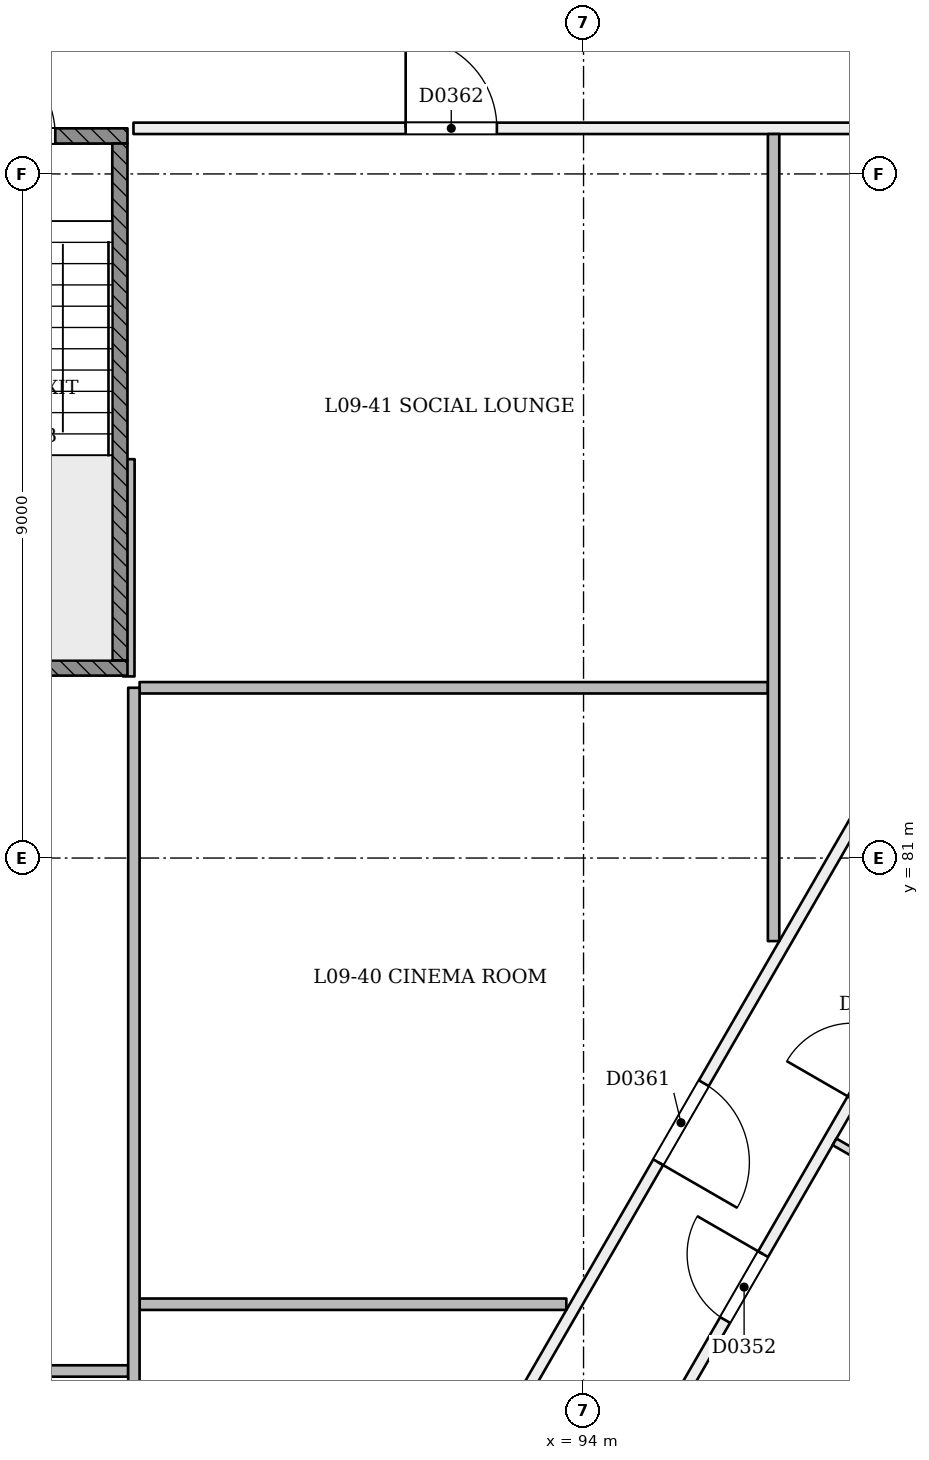
"""IFC4 building model, lengths in metres.
Left out: names, types, materials, properties, quantities, classifications, styles, units other than length and angle.
Written with IfcOpenShell. Run it as: python <this file> out.ifc"""

import sys

from ifc_helpers import new_model, si_unit, direction, frame, frame_2d, origin, place, context, subcontext, project, spatial, rectangle, extrude, element, fill, save


model = new_model("IFC4")
c1 = context("Model", 3, precision=1e-05, world=origin(), true_north=direction((0.0, 1.0)))
c2 = subcontext(c1, "Body", "Model", "MODEL_VIEW")
j1 = project(units=[si_unit("LENGTHUNIT", "METRE"), si_unit("PLANEANGLEUNIT", "RADIAN")], contexts=[c1])
p1 = place(None, origin())
s1 = spatial("IfcSite", under=j1, at=p1, CompositionType="ELEMENT")
p2 = place(p1, origin())
s2 = spatial("IfcBuilding", under=s1, at=p2, CompositionType="ELEMENT")
p3 = place(p2, frame((0.0, 0.0, 41.4)))
s3 = spatial("IfcBuildingStorey", under=s2, at=p3, CompositionType="ELEMENT", Elevation=41.4)
p4 = place(p3, frame((88.237, 61.716, 0.0), z_axis=(0.0, 0.0, 1.0), x_axis=(0.500002225217, 0.866024119051, 0.0)))
e1 = element("IfcWall", 1, at=p4, inside=s3, PredefinedType="PARTITIONING", context=c2, shape_type="SweptSolid", body=[
    extrude(rectangle(XDim=38.6, YDim=0.15, at=frame_2d((19.3, 0.0))), origin(), (0.0, 0.0, 1.0), 2.7),
])
p5 = place(p4, frame((0.72, 0.0, 0.0)))
e2 = element("IfcOpeningElement", 2, at=p5, cuts=e1, PredefinedType="OPENING", context=c2, shape_type="SweptSolid", body=[
    extrude(rectangle(XDim=1.0, YDim=2.1, at=frame_2d((0.5, 1.05))), frame((0.0, 0.085, 0.0), z_axis=(0.0, -1.0, 0.0), x_axis=(1.0, 0.0, 0.0)), (0.0, 0.0, 1.0), 0.171),
])
p6 = place(p4, frame((7.395, 0.0, 0.0)))
e3 = element("IfcOpeningElement", 3, at=p6, cuts=e1, PredefinedType="OPENING", context=c2, shape_type="SweptSolid", body=[
    extrude(rectangle(XDim=1.0, YDim=2.1, at=frame_2d((0.5, 1.05))), frame((0.0, 0.085, 0.0), z_axis=(0.0, -1.0, 0.0), x_axis=(1.0, 0.0, 0.0)), (0.0, 0.0, 1.0), 0.171),
])
p7 = place(p4, frame((9.605, 0.0, 0.0)))
e4 = element("IfcOpeningElement", 4, at=p7, cuts=e1, PredefinedType="OPENING", context=c2, shape_type="SweptSolid", body=[
    extrude(rectangle(XDim=1.0, YDim=2.1, at=frame_2d((0.5, 1.05))), frame((0.0, 0.085, 0.0), z_axis=(0.0, -1.0, 0.0), x_axis=(1.0, 0.0, 0.0)), (0.0, 0.0, 1.0), 0.171),
])
p8 = place(p4, frame((15.25, 0.0, 0.0)))
e5 = element("IfcOpeningElement", 5, at=p8, cuts=e1, PredefinedType="OPENING", context=c2, shape_type="SweptSolid", body=[
    extrude(rectangle(XDim=1.0, YDim=2.1, at=frame_2d((0.5, 1.05))), frame((0.0, 0.085, 0.0), z_axis=(0.0, -1.0, 0.0), x_axis=(1.0, 0.0, 0.0)), (0.0, 0.0, 1.0), 0.171),
])
p9 = place(p4, frame((18.605, 0.0, 0.0)))
e6 = element("IfcOpeningElement", 6, at=p9, cuts=e1, PredefinedType="OPENING", context=c2, shape_type="SweptSolid", body=[
    extrude(rectangle(XDim=1.0, YDim=2.1, at=frame_2d((0.5, 1.05))), frame((0.0, 0.085, 0.0), z_axis=(0.0, -1.0, 0.0), x_axis=(1.0, 0.0, 0.0)), (0.0, 0.0, 1.0), 0.171),
])
p10 = place(p4, frame((25.395, 0.0, 0.0)))
e7 = element("IfcOpeningElement", 7, at=p10, cuts=e1, PredefinedType="OPENING", context=c2, shape_type="SweptSolid", body=[
    extrude(rectangle(XDim=1.0, YDim=2.1, at=frame_2d((0.5, 1.05))), frame((0.0, 0.085, 0.0), z_axis=(0.0, -1.0, 0.0), x_axis=(1.0, 0.0, 0.0)), (0.0, 0.0, 1.0), 0.171),
])
p11 = place(p4, frame((29.8, 0.0, 0.0)))
e8 = element("IfcOpeningElement", 8, at=p11, cuts=e1, PredefinedType="OPENING", context=c2, shape_type="SweptSolid", body=[
    extrude(rectangle(XDim=1.2, YDim=2.1, at=frame_2d((0.6, 1.05))), frame((0.0, 0.085, 0.0), z_axis=(0.0, -1.0, 0.0), x_axis=(1.0, 0.0, 0.0)), (0.0, 0.0, 1.0), 0.171),
])
p12 = place(p4, frame((37.145, 0.0, 0.0)))
e9 = element("IfcOpeningElement", 9, at=p12, cuts=e1, PredefinedType="OPENING", context=c2, shape_type="SweptSolid", body=[
    extrude(rectangle(XDim=1.2, YDim=2.1, at=frame_2d((0.6, 1.05))), frame((0.0, 0.085, 0.0), z_axis=(0.0, -1.0, 0.0), x_axis=(1.0, 0.0, 0.0)), (0.0, 0.0, 1.0), 0.171),
])
p13 = place(p3, frame((88.079, 90.6, 0.0), z_axis=(0.0, 0.0, 1.0), x_axis=(1.0, 0.0, 0.0)))
e10 = element("IfcWall", 10, at=p13, inside=s3, PredefinedType="PARTITIONING", context=c2, shape_type="SweptSolid", body=[
    extrude(rectangle(XDim=14.626, YDim=0.15, at=frame_2d((7.313, 0.0))), origin(), (0.0, 0.0, 1.0), 3.1),
])
p14 = place(p13, frame((3.581, 0.0, 0.0)))
e11 = element("IfcOpeningElement", 11, at=p14, cuts=e10, PredefinedType="OPENING", context=c2, shape_type="SweptSolid", body=[
    extrude(rectangle(XDim=1.2, YDim=2.1, at=frame_2d((0.6, 1.05))), frame((0.0, 0.085, 0.0), z_axis=(0.0, -1.0, 0.0), x_axis=(1.0, 0.0, 0.0)), (0.0, 0.0, 1.0), 0.171),
])
p15 = place(p3, frame((102.835, 90.6, 0.0), z_axis=(0.0, 0.0, 1.0), x_axis=(-0.49999562485, -0.866027929764, 0.0)))
e12 = element("IfcWall", 12, at=p15, inside=s3, PredefinedType="PARTITIONING", context=c2, shape_type="SweptSolid", body=[
    extrude(rectangle(XDim=35.561, YDim=0.15, at=frame_2d((17.781, 0.0))), origin(), (0.0, 0.0, 1.0), 3.1),
])
p16 = place(p15, frame((14.506, 0.0, 0.0)))
e13 = element("IfcOpeningElement", 13, at=p16, cuts=e12, PredefinedType="OPENING", context=c2, shape_type="SweptSolid", body=[
    extrude(rectangle(XDim=1.2, YDim=2.1, at=frame_2d((0.6, 1.05))), frame((0.0, 0.085, 0.0), z_axis=(0.0, -1.0, 0.0), x_axis=(1.0, 0.0, 0.0)), (0.0, 0.0, 1.0), 0.171),
])
p17 = place(p15, frame((29.404, 0.0, 0.0)))
e14 = element("IfcOpeningElement", 14, at=p17, cuts=e12, PredefinedType="OPENING", context=c2, shape_type="SweptSolid", body=[
    extrude(rectangle(XDim=1.2, YDim=2.1, at=frame_2d((0.6, 1.05))), frame((0.0, 0.085, 0.0), z_axis=(0.0, -1.0, 0.0), x_axis=(1.0, 0.0, 0.0)), (0.0, 0.0, 1.0), 0.171),
])
p18 = place(p15, frame((4.779, 0.0, 0.0)))
e15 = element("IfcOpeningElement", 15, at=p18, cuts=e12, PredefinedType="OPENING", context=c2, shape_type="SweptSolid", body=[
    extrude(rectangle(XDim=1.0, YDim=2.1, at=frame_2d((0.5, 1.05))), frame((0.0, 0.085, 0.0), z_axis=(0.0, -1.0, 0.0), x_axis=(1.0, 0.0, 0.0)), (0.0, 0.0, 1.0), 0.171),
])
p19 = place(p15, frame((22.212, 0.0, 0.0)))
e16 = element("IfcOpeningElement", 16, at=p19, cuts=e12, PredefinedType="OPENING", context=c2, shape_type="SweptSolid", body=[
    extrude(rectangle(XDim=1.0, YDim=2.1, at=frame_2d((0.5, 1.05))), frame((0.0, 0.085, 0.0), z_axis=(0.0, -1.0, 0.0), x_axis=(1.0, 0.0, 0.0)), (0.0, 0.0, 1.0), 0.171),
])
p20 = place(p3, frame((102.797, 74.094, 0.0), z_axis=(0.0, 0.0, 1.0), x_axis=(-0.866025401434, 0.500000004071, 0.0)))
e17 = element("IfcWall", 17, at=p20, inside=s3, PredefinedType="PARTITIONING", context=c2, shape_type="SweptSolid", body=[
    extrude(rectangle(XDim=6.345, YDim=0.1, at=frame_2d((3.173, 0.0))), origin(), (0.0, 0.0, 1.0), 2.6),
])
p21 = place(p3, frame((88.017, 83.389, 0.0), z_axis=(0.0, 0.0, 1.0), x_axis=(0.000597983833, 0.999999821208, 0.0)))
e18 = element("IfcWall", 18, at=p21, inside=s3, PredefinedType="PARTITIONING", context=c2, shape_type="SweptSolid", body=[
    extrude(rectangle(XDim=2.858, YDim=0.15, at=frame_2d((1.429, 0.0))), origin(), (0.0, 0.0, 1.0), 3.1),
])
p22 = place(p3, frame((76.733, 74.252, 0.0), z_axis=(0.0, 0.0, 1.0), x_axis=(1.0, 0.0, 0.0)))
e19 = element("IfcWall", 19, at=p22, inside=s3, PredefinedType="PARTITIONING", context=c2, shape_type="SweptSolid", body=[
    extrude(rectangle(XDim=11.276, YDim=0.15, at=frame_2d((5.638, 0.0))), origin(), (0.0, 0.0, 1.0), 3.1),
])
p23 = place(p3, frame((96.425, 83.24, 0.0), z_axis=(0.0, 0.0, 1.0), x_axis=(-1.0, 0.0, 0.0)))
e20 = element("IfcWall", 20, at=p23, inside=s3, PredefinedType="PARTITIONING", context=c2, shape_type="SweptSolid", body=[
    extrude(rectangle(XDim=8.266, YDim=0.15, at=frame_2d((4.133, 0.0))), origin(), (0.0, 0.0, 1.0), 3.1),
])
p24 = place(p3, frame((88.159, 75.13, 0.0), z_axis=(0.0, 0.0, 1.0), x_axis=(1.0, 0.0, 0.0)))
e21 = element("IfcWall", 21, at=p24, inside=s3, PredefinedType="PARTITIONING", context=c2, shape_type="SweptSolid", body=[
    extrude(rectangle(XDim=5.615, YDim=0.15, at=frame_2d((2.807, 0.0))), origin(), (0.0, 0.0, 1.0), 3.1),
])
p25 = place(p3, frame((96.5, 79.907, 0.0), z_axis=(0.0, 0.0, 1.0), x_axis=(0.0, 1.0, 0.0)))
e22 = element("IfcWall", 22, at=p25, inside=s3, PredefinedType="PARTITIONING", context=c2, shape_type="SweptSolid", body=[
    extrude(rectangle(XDim=10.618, YDim=0.15, at=frame_2d((5.309, 0.0))), origin(), (0.0, 0.0, 1.0), 3.1),
])
p26 = place(p3, frame((88.084, 65.33, 0.0), z_axis=(0.0, 0.0, 1.0), x_axis=(0.0, 1.0, 0.0)))
e23 = element("IfcWall", 23, at=p26, inside=s3, PredefinedType="PARTITIONING", context=c2, shape_type="SweptSolid", body=[
    extrude(rectangle(XDim=17.91, YDim=0.15, at=frame_2d((8.955, 0.0))), origin(), (0.0, 0.0, 1.0), 3.1),
])
p27 = place(p3, frame((82.0, 90.5, 0.0), z_axis=(0.0, 0.0, 1.0), x_axis=(1.0, 0.0, 0.0)))
e24 = element("IfcWall", 24, at=p27, inside=s3, PredefinedType="SOLIDWALL", context=c2, shape_type="SweptSolid", body=[
    extrude(rectangle(XDim=6.0, YDim=0.2, at=frame_2d((3.0, 0.0))), origin(), (0.0, 0.0, 1.0), 3.1),
])
p28 = place(p27, frame((0.95, 0.0, 0.0)))
e25 = element("IfcOpeningElement", 25, at=p28, cuts=e24, PredefinedType="OPENING", context=c2, shape_type="SweptSolid", body=[
    extrude(rectangle(XDim=1.2, YDim=2.1, at=frame_2d((0.6, 1.05))), frame((0.0, 0.11, 0.0), z_axis=(0.0, -1.0, 0.0), x_axis=(1.0, 0.0, 0.0)), (0.0, 0.0, 1.0), 0.221),
])
p29 = place(p27, frame((3.85, 0.0, 0.0)))
e26 = element("IfcOpeningElement", 26, at=p29, cuts=e24, PredefinedType="OPENING", context=c2, shape_type="SweptSolid", body=[
    extrude(rectangle(XDim=1.2, YDim=2.1, at=frame_2d((0.6, 1.05))), frame((0.0, 0.11, 0.0), z_axis=(0.0, -1.0, 0.0), x_axis=(1.0, 0.0, 0.0)), (0.0, 0.0, 1.0), 0.221),
])
p30 = place(p3, frame((82.0, 83.5, 0.0), z_axis=(0.0, 0.0, 1.0), x_axis=(1.0, 0.0, 0.0)))
e27 = element("IfcWall", 27, at=p30, inside=s3, PredefinedType="SOLIDWALL", context=c2, shape_type="SweptSolid", body=[
    extrude(rectangle(XDim=6.0, YDim=0.2, at=frame_2d((3.0, 0.0))), origin(), (0.0, 0.0, 1.0), 3.1),
])
p31 = place(p3, frame((87.9, 83.6, 0.0), z_axis=(0.0, 0.0, 1.0), x_axis=(0.0, 1.0, 0.0)))
e28 = element("IfcWall", 28, at=p31, inside=s3, PredefinedType="SOLIDWALL", context=c2, shape_type="SweptSolid", body=[
    extrude(rectangle(XDim=6.8, YDim=0.2, at=frame_2d((3.4, 0.0))), origin(), (0.0, 0.0, 1.0), 3.1),
])
p32 = place(p8, origin())
e29 = element("IfcDoor", 29, at=p32, inside=s3, OperationType="SINGLE_SWING_RIGHT", PredefinedType="NOTDEFINED", context=c2, shape_type="SweptSolid", body=[
    extrude(rectangle(XDim=1.0, YDim=2.1, at=frame_2d((0.5, 1.05))), frame((0.0, 0.025, 0.0), z_axis=(0.0, -1.0, 0.0), x_axis=(1.0, 0.0, 0.0)), (0.0, 0.0, 1.0), 0.05),
])
fill(e5, e29)
p33 = place(p16, origin())
e30 = element("IfcDoor", 30, at=p33, inside=s3, OperationType="SINGLE_SWING_RIGHT", PredefinedType="NOTDEFINED", context=c2, shape_type="SweptSolid", body=[
    extrude(rectangle(XDim=1.2, YDim=2.1, at=frame_2d((0.6, 1.05))), frame((0.0, 0.025, 0.0), z_axis=(0.0, -1.0, 0.0), x_axis=(1.0, 0.0, 0.0)), (0.0, 0.0, 1.0), 0.05),
])
fill(e13, e30)
p34 = place(p14, origin())
e31 = element("IfcDoor", 31, at=p34, inside=s3, OperationType="SINGLE_SWING_LEFT", PredefinedType="NOTDEFINED", context=c2, shape_type="SweptSolid", body=[
    extrude(rectangle(XDim=1.2, YDim=2.1, at=frame_2d((0.6, 1.05))), frame((0.0, 0.025, 0.0), z_axis=(0.0, -1.0, 0.0), x_axis=(1.0, 0.0, 0.0)), (0.0, 0.0, 1.0), 0.05),
])
fill(e11, e31)
p35 = place(p29, origin())
e32 = element("IfcDoor", 32, at=p35, inside=s3, OperationType="SINGLE_SWING_LEFT", PredefinedType="NOTDEFINED", context=c2, shape_type="SweptSolid", body=[
    extrude(rectangle(XDim=1.2, YDim=2.1, at=frame_2d((0.6, 1.05))), frame((0.0, 0.025, 0.0), z_axis=(0.0, -1.0, 0.0), x_axis=(1.0, 0.0, 0.0)), (0.0, 0.0, 1.0), 0.05),
])
fill(e26, e32)
save(model, sys.argv[1])
